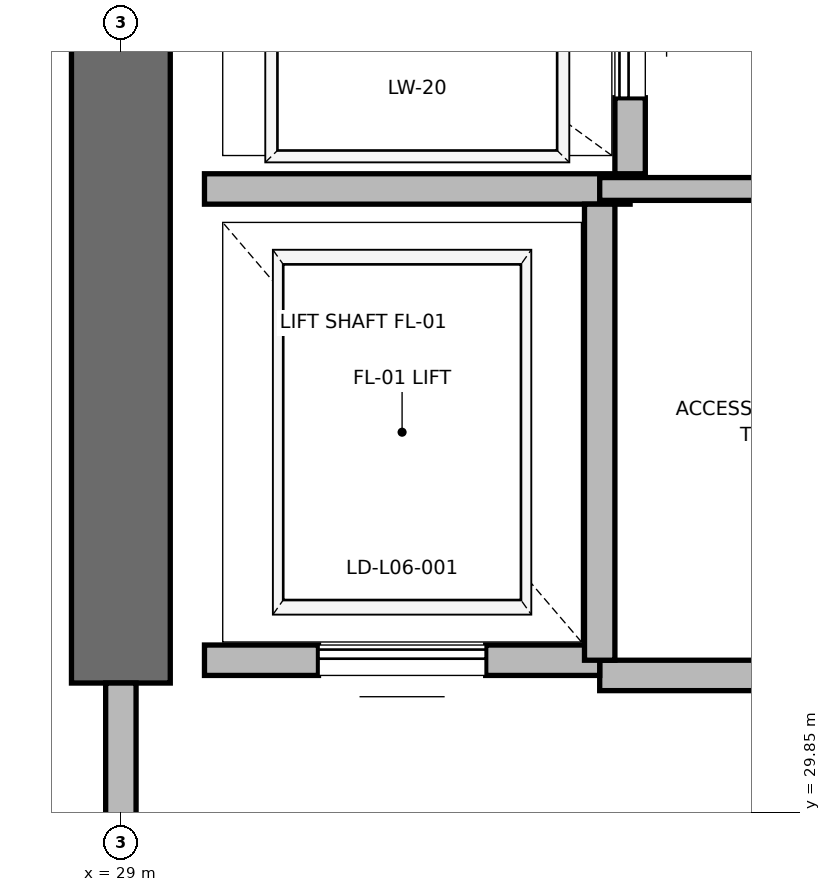
"""IFC4 building model, lengths in metres.
Left out: names, types, materials, properties, quantities, classifications, styles, units other than length and angle.
Written with IfcOpenShell. Run it as: python <this file> out.ifc"""

import sys

from ifc_helpers import new_model, si_unit, direction, frame, frame_2d, origin, place, context, subcontext, project, spatial, rectangle, extrude, element, fill, save


model = new_model("IFC4")
c1 = context("Model", 3, precision=1e-05, world=origin(), true_north=direction((0.0, 1.0)))
c2 = subcontext(c1, "Body", "Model", "MODEL_VIEW")
j1 = project(units=[si_unit("LENGTHUNIT", "METRE"), si_unit("PLANEANGLEUNIT", "RADIAN")], contexts=[c1])
p1 = place(None, origin())
s1 = spatial("IfcSite", under=j1, at=p1, CompositionType="ELEMENT")
p2 = place(p1, origin())
s2 = spatial("IfcBuilding", under=s1, at=p2, CompositionType="ELEMENT")
p3 = place(p2, frame((0.0, 0.0, 31.6)))
s3 = spatial("IfcBuildingStorey", under=s2, at=p3, CompositionType="ELEMENT", Elevation=31.6)
p4 = place(p3, frame((29.0, 30.7, 0.0), z_axis=(0.0, 0.0, 1.0), x_axis=(0.0, 1.0, 0.0)))
e1 = element("IfcWall", 1, at=p4, inside=s3, PredefinedType="SHEAR", context=c2, shape_type="SweptSolid", body=[
    extrude(rectangle(XDim=5.8, YDim=0.65, at=frame_2d((2.9, 0.0))), origin(), (0.0, 0.0, 1.0), 3.76),
])
p5 = place(p3, frame((29.0, 27.3, 0.0), z_axis=(0.0, 0.0, 1.0), x_axis=(0.0, 1.0, 0.0)))
e2 = element("IfcWall", 2, at=p5, inside=s3, PredefinedType="PARTITIONING", context=c2, shape_type="SweptSolid", body=[
    extrude(rectangle(XDim=3.4, YDim=0.2, at=frame_2d((1.7, 0.0))), origin(), (0.0, 0.0, 1.0), 2.54),
])
p6 = place(p5, frame((1.125, 0.0, 0.0)))
e3 = element("IfcOpeningElement", 3, at=p6, cuts=e2, PredefinedType="OPENING", context=c2, shape_type="SweptSolid", body=[
    extrude(rectangle(XDim=1.15, YDim=2.2, at=frame_2d((0.575, 1.1))), frame((0.0, 0.1, 0.0), z_axis=(0.0, -1.0, 0.0), x_axis=(1.0, 0.0, 0.0)), (0.0, 0.0, 1.0), 0.2),
])
p7 = place(p3, frame((32.15, 30.75, 0.0), z_axis=(0.0, 0.0, 1.0), x_axis=(1.0, 0.0, 0.0)))
e4 = element("IfcWall", 4, at=p7, inside=s3, PredefinedType="PARTITIONING", context=c2, shape_type="SweptSolid", body=[
    extrude(rectangle(XDim=3.13, YDim=0.2, at=frame_2d((1.565, 0.0))), origin(), (0.0, 0.0, 1.0), 3.76),
])
p8 = place(p3, frame((29.55, 30.85, 0.0), z_axis=(0.0, 0.0, 1.0), x_axis=(1.0, 0.0, 0.0)))
e5 = element("IfcWall", 5, at=p8, inside=s3, PredefinedType="SOLIDWALL", context=c2, shape_type="SweptSolid", body=[
    extrude(rectangle(XDim=2.6, YDim=0.2, at=frame_2d((1.3, 0.0))), origin(), (0.0, 0.0, 1.0), 2.54),
])
p9 = place(p8, frame((0.75, 0.0, 0.0)))
e6 = element("IfcOpeningElement", 6, at=p9, cuts=e5, PredefinedType="OPENING", context=c2, shape_type="SweptSolid", body=[
    extrude(rectangle(XDim=1.1, YDim=2.2, at=frame_2d((0.55, 1.1))), frame((0.0, 0.1, 0.0), z_axis=(0.0, -1.0, 0.0), x_axis=(1.0, 0.0, 0.0)), (0.0, 0.0, 1.0), 0.2),
])
p10 = place(p3, frame((29.55, 33.95, 0.0), z_axis=(0.0, 0.0, 1.0), x_axis=(1.0, 0.0, 0.0)))
e7 = element("IfcWall", 7, at=p10, inside=s3, PredefinedType="SOLIDWALL", context=c2, shape_type="SweptSolid", body=[
    extrude(rectangle(XDim=2.8, YDim=0.2, at=frame_2d((1.4, 0.0))), origin(), (0.0, 0.0, 1.0), 3.76),
])
p11 = place(p3, frame((32.15, 30.85, 0.0), z_axis=(0.0, 0.0, 1.0), x_axis=(0.0, 1.0, 0.0)))
e8 = element("IfcWall", 8, at=p11, inside=s3, PredefinedType="SOLIDWALL", context=c2, shape_type="SweptSolid", body=[
    extrude(rectangle(XDim=3.0, YDim=0.2, at=frame_2d((1.5, 0.0))), origin(), (0.0, 0.0, 1.0), 3.76),
])
p12 = place(p3, frame((32.35, 34.05, 0.0), z_axis=(0.0, 0.0, 1.0), x_axis=(0.0, 1.0, 0.0)))
e9 = element("IfcWall", 9, at=p12, inside=s3, PredefinedType="SOLIDWALL", context=c2, shape_type="SweptSolid", body=[
    extrude(rectangle(XDim=2.1, YDim=0.2, at=frame_2d((1.05, 0.0))), origin(), (0.0, 0.0, 1.0), 3.76),
])
p13 = place(p12, frame((0.5, 0.0, 0.0)))
e10 = element("IfcOpeningElement", 10, at=p13, cuts=e9, PredefinedType="OPENING", context=c2, shape_type="SweptSolid", body=[
    extrude(rectangle(XDim=1.1, YDim=2.2, at=frame_2d((0.55, 1.1))), frame((0.0, 0.1, 0.0), z_axis=(0.0, -1.0, 0.0), x_axis=(1.0, 0.0, 0.0)), (0.0, 0.0, 1.0), 0.2),
])
p14 = place(p3, frame((32.15, 33.95, 0.0), z_axis=(0.0, 0.0, 1.0), x_axis=(1.0, 0.0, 0.0)))
e11 = element("IfcWall", 11, at=p14, inside=s3, PredefinedType="PARTITIONING", context=c2, shape_type="SweptSolid", body=[
    extrude(rectangle(XDim=3.13, YDim=0.15, at=frame_2d((1.565, 0.0))), origin(), (0.0, 0.0, 1.0), 2.85),
])
p15 = place(p9, origin())
e12 = element("IfcDoor", 12, at=p15, inside=s3, OperationType="SLIDING_TO_RIGHT", PredefinedType="DOOR", context=c2, shape_type="SweptSolid", body=[
    extrude(rectangle(XDim=1.1, YDim=2.2, at=frame_2d((0.55, 1.1))), frame((0.0, 0.025, 0.0), z_axis=(0.0, -1.0, 0.0), x_axis=(1.0, 0.0, 0.0)), (0.0, 0.0, 1.0), 0.05),
])
fill(e6, e12)
p16 = place(p13, origin())
e13 = element("IfcDoor", 13, at=p16, inside=s3, OperationType="SLIDING_TO_RIGHT", PredefinedType="DOOR", context=c2, shape_type="SweptSolid", body=[
    extrude(rectangle(XDim=1.1, YDim=2.2, at=frame_2d((0.55, 1.1))), frame((0.0, 0.025, 0.0), z_axis=(0.0, -1.0, 0.0), x_axis=(1.0, 0.0, 0.0)), (0.0, 0.0, 1.0), 0.05),
])
fill(e10, e13)
save(model, sys.argv[1])
